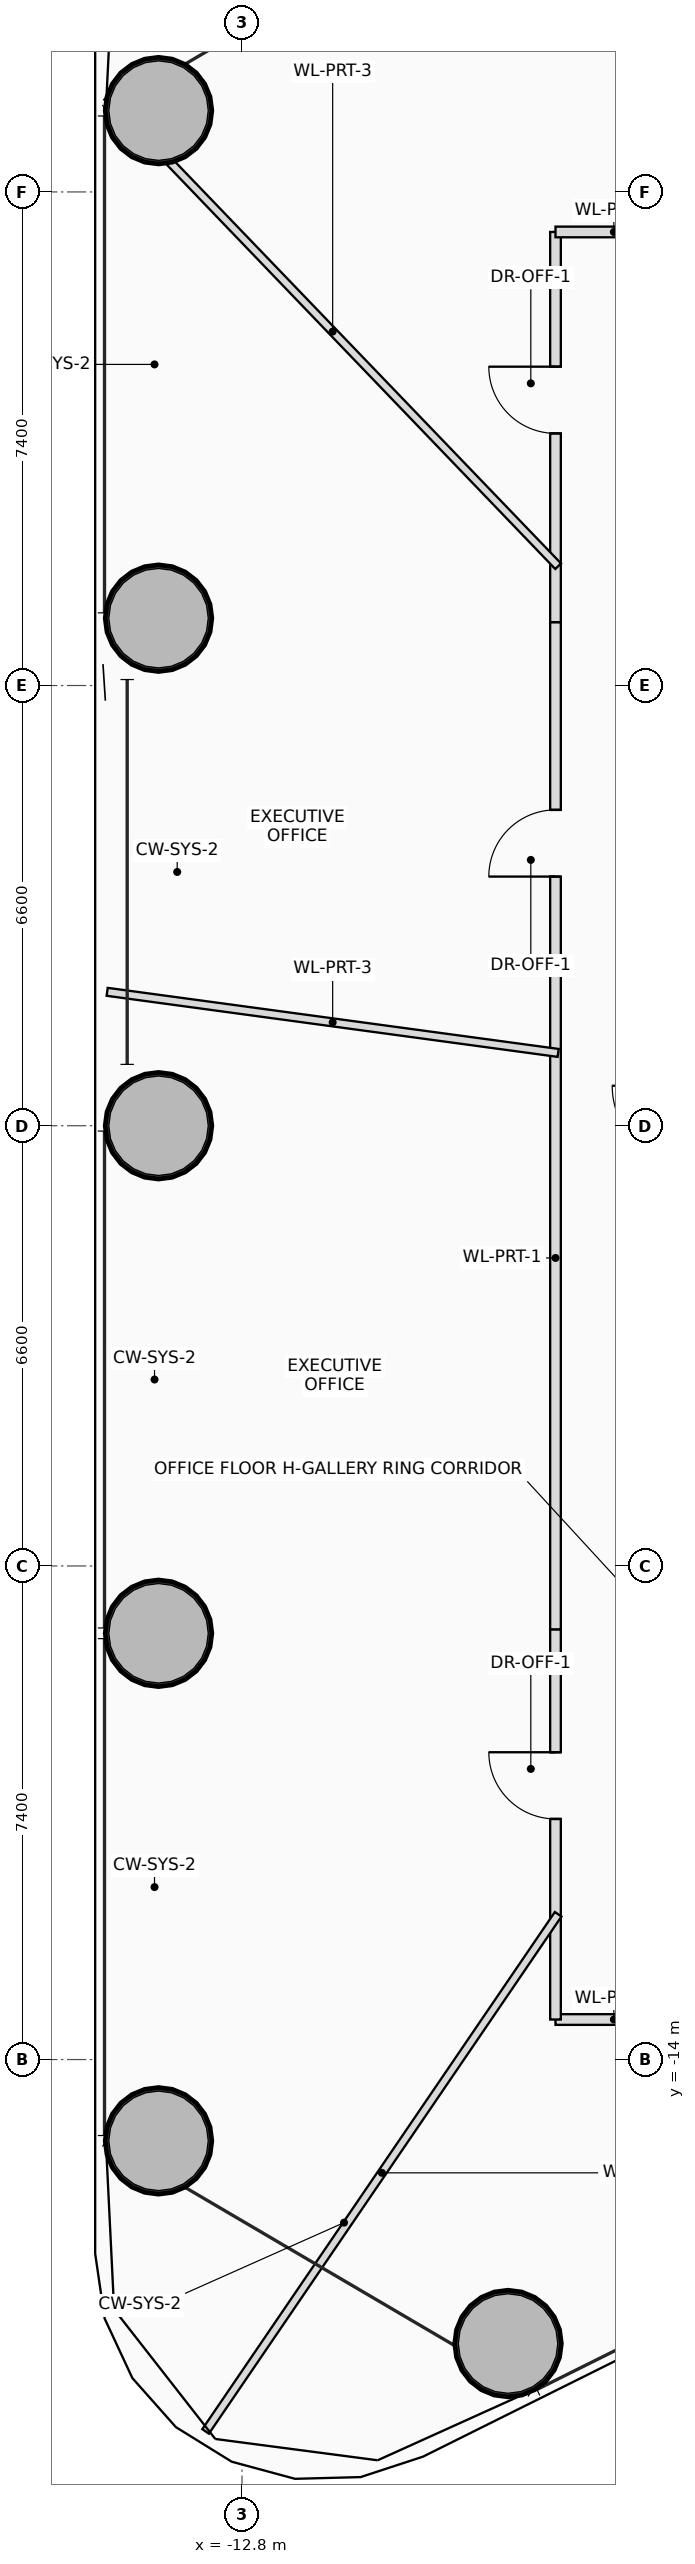
"""IFC4 building model, lengths in metres.
Left out: names, types, materials, properties, quantities, classifications, styles, units other than length and angle.
Written with IfcOpenShell. Run it as: python <this file> out.ifc"""

import sys

from ifc_helpers import new_model, si_unit, direction, frame, frame_2d, origin, origin_2d, place, context, subcontext, project, spatial, rectangle, hollow_circle, extrude, source, transform, mapped, element, fill, save


model = new_model("IFC4")
c1 = context("Model", 3, precision=1e-05, world=origin(), true_north=direction((0.0, 1.0)))
c2 = subcontext(c1, "Body", "Model", "MODEL_VIEW")
j1 = project(units=[si_unit("LENGTHUNIT", "METRE"), si_unit("PLANEANGLEUNIT", "RADIAN")], contexts=[c1])
p1 = place(None, origin())
s1 = spatial("IfcSite", under=j1, at=p1, CompositionType="ELEMENT")
p2 = place(p1, origin())
s2 = spatial("IfcBuilding", under=s1, at=p2, CompositionType="ELEMENT")
p3 = place(p2, frame((0.0, 0.0, 34.9)))
s3 = spatial("IfcBuildingStorey", under=s2, at=p3, CompositionType="ELEMENT", Elevation=34.9)
m1 = source(origin(), c2, "Body", "SweptSolid", [
    extrude(hollow_circle(Radius=0.8, WallThickness=0.055, at=origin_2d()), origin(), (0.0, 0.0, 1.0), 3.7),
])
for number, where, z_axis, x_axis in (
    (1, (-8.812, -18.258, 0.0), (0.0, 0.0, 1.0), (1.0, 0.0, 0.0)),
    (2, (-14.052, 15.219, 0.0), (0.0, 0.0, 1.0), (1.0, 0.0, 0.0)),
    (3, (-14.052, 7.61, 0.0), (0.0, 0.0, 1.0), (1.0, 0.0, 0.0)),
    (4, (-14.052, 0.0, 0.0), (0.0, 0.0, 1.0), (1.0, 0.0, 0.0)),
    (5, (-14.052, -7.61, 0.0), (0.0, 0.0, 1.0), (1.0, 0.0, 0.0)),
    (6, (-14.052, -15.219, 0.0), (0.0, 0.0, 1.0), (1.0, 0.0, 0.0)),
):
    element("IfcColumn", number, at=place(p3, frame(where, z_axis=z_axis, x_axis=x_axis)), inside=s3, PredefinedType="COLUMN", context=c2, shape_type="MappedRepresentation", body=[
        mapped(m1, transform((0.0, 0.0, 0.0), scale=1.0)),
    ])
p4 = place(p3, frame((-6.35, -13.4, 0.0), z_axis=(0.0, 0.0, 1.0), x_axis=(-1.0, 0.0, 0.0)))
e7 = element("IfcWall", 7, at=p4, inside=s3, PredefinedType="PARTITIONING", context=c2, shape_type="SweptSolid", body=[
    extrude(rectangle(XDim=1.75, YDim=0.16, at=frame_2d((0.875, 0.0))), origin(), (0.0, 0.0, 1.0), 2.8),
])
p5 = place(p3, frame((-8.1, -13.4, 0.0), z_axis=(0.0, 0.0, 1.0), x_axis=(0.0, 1.0, 0.0)))
e8 = element("IfcWall", 8, at=p5, inside=s3, PredefinedType="PARTITIONING", context=c2, shape_type="SweptSolid", body=[
    extrude(rectangle(XDim=5.85, YDim=0.16, at=frame_2d((2.925, 0.0))), origin(), (0.0, 0.0, 1.0), 2.8),
])
p6 = place(p5, frame((3.007, 0.0, 0.0)))
e9 = element("IfcOpeningElement", 9, at=p6, cuts=e8, PredefinedType="OPENING", context=c2, shape_type="SweptSolid", body=[
    extrude(rectangle(XDim=1.0, YDim=2.25, at=frame_2d((0.5, 1.125))), frame((0.0, 0.09, 0.0), z_axis=(0.0, -1.0, 0.0), x_axis=(1.0, 0.0, 0.0)), (0.0, 0.0, 1.0), 0.18),
])
p7 = place(p3, frame((-8.1, -7.55, 0.0), z_axis=(0.0, 0.0, 1.0), x_axis=(0.0, 1.0, 0.0)))
e10 = element("IfcWall", 10, at=p7, inside=s3, PredefinedType="PARTITIONING", context=c2, shape_type="SweptSolid", body=[
    extrude(rectangle(XDim=15.1, YDim=0.16, at=frame_2d((7.55, 0.0))), origin(), (0.0, 0.0, 1.0), 2.8),
])
p8 = place(p7, frame((11.285, 0.0, 0.0)))
e11 = element("IfcOpeningElement", 11, at=p8, cuts=e10, PredefinedType="OPENING", context=c2, shape_type="SweptSolid", body=[
    extrude(rectangle(XDim=1.0, YDim=2.25, at=frame_2d((0.5, 1.125))), frame((0.0, 0.09, 0.0), z_axis=(0.0, -1.0, 0.0), x_axis=(1.0, 0.0, 0.0)), (0.0, 0.0, 1.0), 0.18),
])
p9 = place(p3, frame((-8.1, 7.55, 0.0), z_axis=(0.0, 0.0, 1.0), x_axis=(0.0, 1.0, 0.0)))
e12 = element("IfcWall", 12, at=p9, inside=s3, PredefinedType="PARTITIONING", context=c2, shape_type="SweptSolid", body=[
    extrude(rectangle(XDim=5.85, YDim=0.16, at=frame_2d((2.925, 0.0))), origin(), (0.0, 0.0, 1.0), 2.8),
])
p10 = place(p9, frame((2.83, 0.0, 0.0)))
e13 = element("IfcOpeningElement", 13, at=p10, cuts=e12, PredefinedType="OPENING", context=c2, shape_type="SweptSolid", body=[
    extrude(rectangle(XDim=1.0, YDim=2.25, at=frame_2d((0.5, 1.125))), frame((0.0, 0.09, 0.0), z_axis=(0.0, -1.0, 0.0), x_axis=(1.0, 0.0, 0.0)), (0.0, 0.0, 1.0), 0.18),
])
p11 = place(p3, frame((-8.1, 13.4, 0.0), z_axis=(0.0, 0.0, 1.0), x_axis=(1.0, 0.0, 0.0)))
e14 = element("IfcWall", 14, at=p11, inside=s3, PredefinedType="PARTITIONING", context=c2, shape_type="SweptSolid", body=[
    extrude(rectangle(XDim=1.75, YDim=0.16, at=frame_2d((0.875, 0.0))), origin(), (0.0, 0.0, 1.0), 2.8),
])
p12 = place(p3, frame((-8.06, 8.388, 0.0), z_axis=(0.0, 0.0, 1.0), x_axis=(-0.692869708489, 0.721062803823, 0.0)))
e15 = element("IfcWall", 15, at=p12, inside=s3, PredefinedType="PARTITIONING", context=c2, shape_type="SweptSolid", body=[
    extrude(rectangle(XDim=9.759, YDim=0.12, at=frame_2d((4.88, 0.0))), origin(), (0.0, 0.0, 1.0), 2.8),
])
p13 = place(p3, frame((-8.06, 1.092, 0.0), z_axis=(0.0, 0.0, 1.0), x_axis=(-0.990948874496, 0.13423981576, 0.0)))
e16 = element("IfcWall", 16, at=p13, inside=s3, PredefinedType="PARTITIONING", context=c2, shape_type="SweptSolid", body=[
    extrude(rectangle(XDim=6.824, YDim=0.12, at=frame_2d((3.412, 0.0))), origin(), (0.0, 0.0, 1.0), 2.96),
])
p14 = place(p3, frame((-8.06, -11.822, 0.0), z_axis=(0.0, 0.0, 1.0), x_axis=(-0.56331583488, -0.826241653618, 0.0)))
e17 = element("IfcWall", 17, at=p14, inside=s3, PredefinedType="PARTITIONING", context=c2, shape_type="SweptSolid", body=[
    extrude(rectangle(XDim=9.384, YDim=0.12, at=frame_2d((4.692, 0.0))), origin(), (0.0, 0.0, 1.0), 2.96),
])
p15 = place(p6, origin())
e18 = element("IfcDoor", 18, at=p15, inside=s3, OperationType="SINGLE_SWING_RIGHT", PredefinedType="DOOR", context=c2, shape_type="SweptSolid", body=[
    extrude(rectangle(XDim=1.0, YDim=2.25, at=frame_2d((0.5, 1.125))), frame((0.0, 0.025, 0.0), z_axis=(0.0, -1.0, 0.0), x_axis=(1.0, 0.0, 0.0)), (0.0, 0.0, 1.0), 0.05),
])
fill(e9, e18)
p16 = place(p8, origin())
e19 = element("IfcDoor", 19, at=p16, inside=s3, OperationType="SINGLE_SWING_LEFT", PredefinedType="DOOR", context=c2, shape_type="SweptSolid", body=[
    extrude(rectangle(XDim=1.0, YDim=2.25, at=frame_2d((0.5, 1.125))), frame((0.0, 0.025, 0.0), z_axis=(0.0, -1.0, 0.0), x_axis=(1.0, 0.0, 0.0)), (0.0, 0.0, 1.0), 0.05),
])
fill(e11, e19)
p17 = place(p10, origin())
e20 = element("IfcDoor", 20, at=p17, inside=s3, OperationType="SINGLE_SWING_RIGHT", PredefinedType="DOOR", context=c2, shape_type="SweptSolid", body=[
    extrude(rectangle(XDim=1.0, YDim=2.25, at=frame_2d((0.5, 1.125))), frame((0.0, 0.025, 0.0), z_axis=(0.0, -1.0, 0.0), x_axis=(1.0, 0.0, 0.0)), (0.0, 0.0, 1.0), 0.05),
])
fill(e13, e20)
save(model, sys.argv[1])
